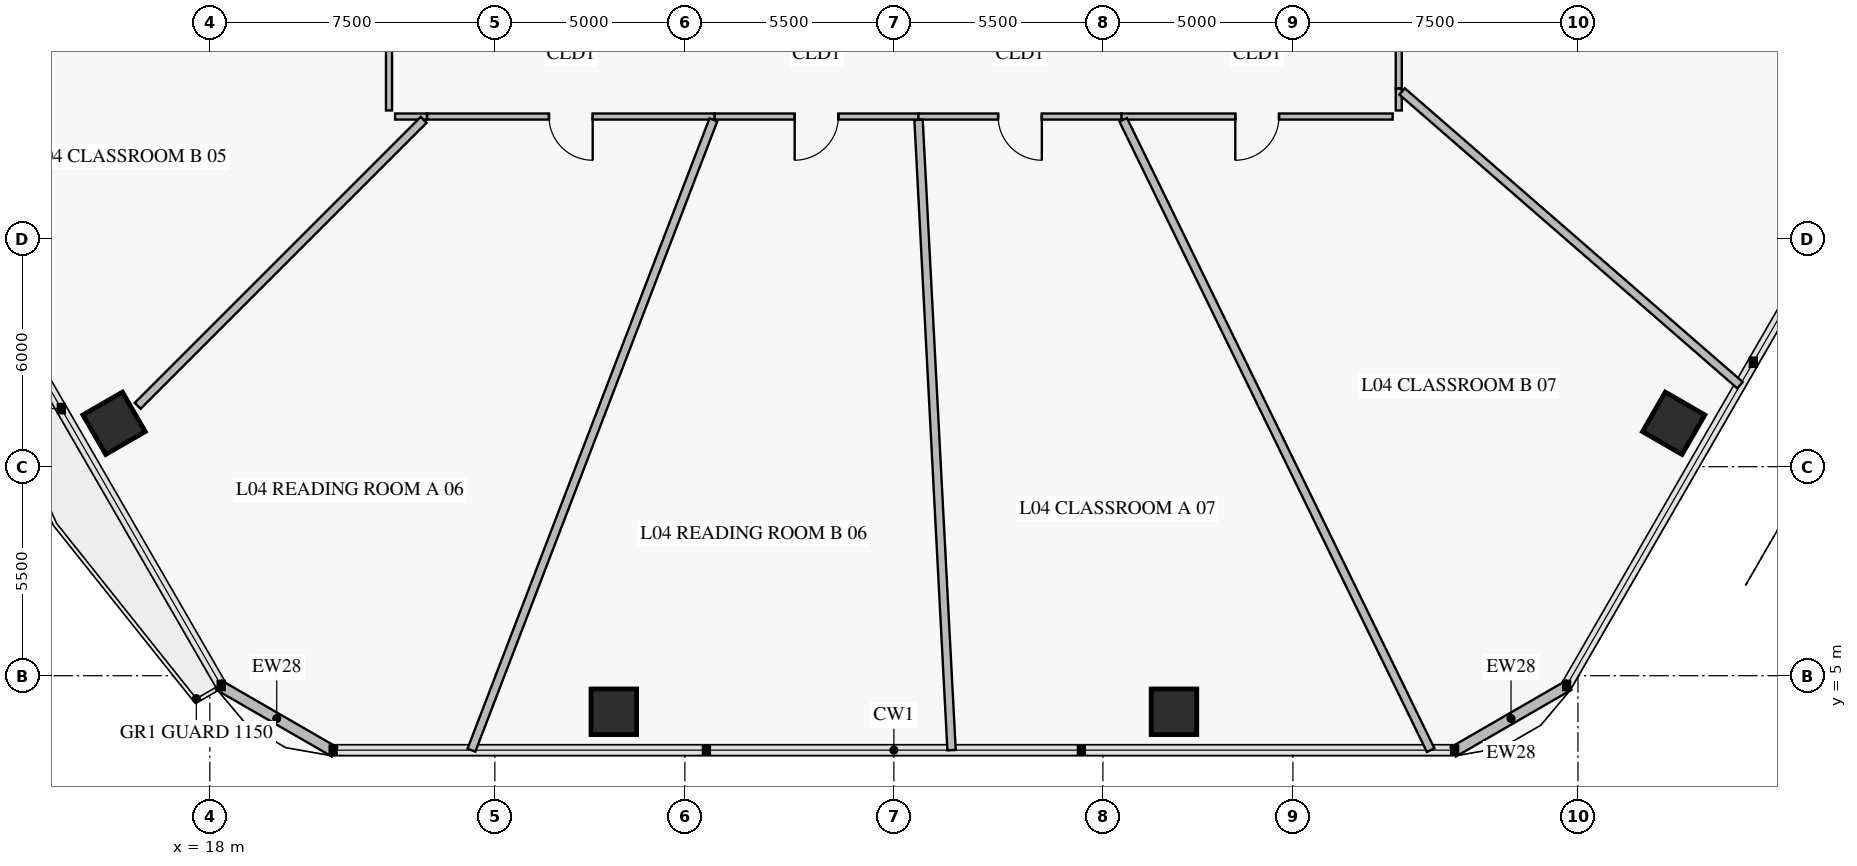
"""IFC4 building model, lengths in metres.
Left out: names, types, materials, properties, quantities, classifications, styles, units other than length and angle.
Written with IfcOpenShell. Run it as: python <this file> out.ifc"""

import sys

from ifc_helpers import new_model, si_unit, direction, frame, frame_2d, origin, origin_2d, place, context, subcontext, project, spatial, rectangle, extrude, element, fill, save


model = new_model("IFC4")
c1 = context("Model", 3, precision=1e-05, world=origin(), true_north=direction((0.0, 1.0)))
c2 = subcontext(c1, "Body", "Model", "MODEL_VIEW")
j1 = project(units=[si_unit("LENGTHUNIT", "METRE"), si_unit("PLANEANGLEUNIT", "RADIAN")], contexts=[c1])
p1 = place(None, origin())
s1 = spatial("IfcSite", under=j1, at=p1, CompositionType="ELEMENT")
p2 = place(p1, origin())
s2 = spatial("IfcBuilding", under=s1, at=p2, CompositionType="ELEMENT")
p3 = place(p2, frame((0.0, 0.0, 16.2)))
s3 = spatial("IfcBuildingStorey", under=s2, at=p3, CompositionType="ELEMENT", Elevation=16.2)
for number, where, z_axis, x_axis in (
    (1, (15.481, 11.643, 0.0), (0.0, 0.0, 1.0), (0.5, -0.866, 0.0)),
    (2, (28.63, 4.052, 0.0), (0.0, 0.0, 1.0), (1.0, 0.0, 0.0)),
    (3, (43.37, 4.052, 0.0), (0.0, 0.0, 1.0), (1.0, 0.0, 0.0)),
    (4, (56.519, 11.643, 0.0), (0.0, 0.0, 1.0), (0.5, 0.866, 0.0)),
):
    element("IfcColumn", number, at=place(p3, frame(where, z_axis=z_axis, x_axis=x_axis)), inside=s3, PredefinedType="COLUMN", context=c2, shape_type="SweptSolid", body=[
        extrude(rectangle(XDim=1.2, YDim=1.2, at=origin_2d()), origin(), (0.0, 0.0, 1.0), 3.92),
    ])
for number, where, z_axis, x_axis in (
    (5, (53.761, 4.751, 0.0), (0.0, 0.0, 1.0), (-0.866, -0.5, 0.0)),
    (6, (21.283, 2.994, 0.0), (0.0, 0.0, 1.0), (-0.866, 0.5, 0.0)),
):
    element("IfcWall", number, at=place(p3, frame(where, z_axis=z_axis, x_axis=x_axis)), inside=s3, PredefinedType="SOLIDWALL", context=c2, shape_type="SweptSolid", body=[
        extrude(rectangle(XDim=3.515, YDim=0.28, at=frame_2d((1.757, 0.0))), origin(), (0.0, 0.0, 1.0), 3.92),
    ])
p4 = place(p3, frame((22.715, 26.633, 0.0), z_axis=(0.0, 0.0, 1.0), x_axis=(0.0, -1.0, 0.0)))
e7 = element("IfcWall", 7, at=p4, inside=s3, PredefinedType="PARTITIONING", context=c2, shape_type="SweptSolid", body=[
    extrude(rectangle(XDim=6.758, YDim=0.16, at=frame_2d((3.379, 0.0))), origin(), (0.0, 0.0, 1.0), 3.92),
])
p5 = place(p4, frame((2.804, 0.0, 0.0)))
e8 = element("IfcOpeningElement", 8, at=p5, cuts=e7, PredefinedType="OPENING", context=c2, shape_type="SweptSolid", body=[
    extrude(rectangle(XDim=1.15, YDim=2.2, at=frame_2d((0.575, 1.1))), frame((0.0, 0.092, 0.0), z_axis=(0.0, -1.0, 0.0), x_axis=(1.0, 0.0, 0.0)), (0.0, 0.0, 1.0), 0.184),
])
p6 = place(p3, frame((23.715, 19.715, 0.0), z_axis=(0.0, 0.0, 1.0), x_axis=(1.0, 0.0, 0.0)))
e9 = element("IfcWall", 9, at=p6, inside=s3, PredefinedType="PARTITIONING", context=c2, shape_type="SweptSolid", body=[
    extrude(rectangle(XDim=7.569, YDim=0.16, at=frame_2d((3.785, 0.0))), origin(), (0.0, 0.0, 1.0), 3.22),
])
p7 = place(p6, frame((3.21, 0.0, 0.0)))
e10 = element("IfcOpeningElement", 10, at=p7, cuts=e9, PredefinedType="OPENING", context=c2, shape_type="SweptSolid", body=[
    extrude(rectangle(XDim=1.15, YDim=2.2, at=frame_2d((0.575, 1.1))), frame((0.0, 0.092, 0.0), z_axis=(0.0, -1.0, 0.0), x_axis=(1.0, 0.0, 0.0)), (0.0, 0.0, 1.0), 0.184),
])
p8 = place(p3, frame((31.284, 19.715, 0.0), z_axis=(0.0, 0.0, 1.0), x_axis=(1.0, 0.0, 0.0)))
e11 = element("IfcWall", 11, at=p8, inside=s3, PredefinedType="PARTITIONING", context=c2, shape_type="SweptSolid", body=[
    extrude(rectangle(XDim=5.36, YDim=0.16, at=frame_2d((2.68, 0.0))), origin(), (0.0, 0.0, 1.0), 3.22),
])
p9 = place(p8, frame((2.105, 0.0, 0.0)))
e12 = element("IfcOpeningElement", 12, at=p9, cuts=e11, PredefinedType="OPENING", context=c2, shape_type="SweptSolid", body=[
    extrude(rectangle(XDim=1.15, YDim=2.2, at=frame_2d((0.575, 1.1))), frame((0.0, 0.092, 0.0), z_axis=(0.0, -1.0, 0.0), x_axis=(1.0, 0.0, 0.0)), (0.0, 0.0, 1.0), 0.184),
])
p10 = place(p3, frame((36.644, 19.715, 0.0), z_axis=(0.0, 0.0, 1.0), x_axis=(1.0, 0.0, 0.0)))
e13 = element("IfcWall", 13, at=p10, inside=s3, PredefinedType="PARTITIONING", context=c2, shape_type="SweptSolid", body=[
    extrude(rectangle(XDim=5.348, YDim=0.16, at=frame_2d((2.674, 0.0))), origin(), (0.0, 0.0, 1.0), 3.22),
])
p11 = place(p10, frame((2.099, 0.0, 0.0)))
e14 = element("IfcOpeningElement", 14, at=p11, cuts=e13, PredefinedType="OPENING", context=c2, shape_type="SweptSolid", body=[
    extrude(rectangle(XDim=1.15, YDim=2.2, at=frame_2d((0.575, 1.1))), frame((0.0, 0.092, 0.0), z_axis=(0.0, -1.0, 0.0), x_axis=(1.0, 0.0, 0.0)), (0.0, 0.0, 1.0), 0.184),
])
p12 = place(p3, frame((41.992, 19.715, 0.0), z_axis=(0.0, 0.0, 1.0), x_axis=(1.0, 0.0, 0.0)))
e15 = element("IfcWall", 15, at=p12, inside=s3, PredefinedType="PARTITIONING", context=c2, shape_type="SweptSolid", body=[
    extrude(rectangle(XDim=7.133, YDim=0.16, at=frame_2d((3.567, 0.0))), origin(), (0.0, 0.0, 1.0), 3.22),
])
p13 = place(p12, frame((2.992, 0.0, 0.0)))
e16 = element("IfcOpeningElement", 16, at=p13, cuts=e15, PredefinedType="OPENING", context=c2, shape_type="SweptSolid", body=[
    extrude(rectangle(XDim=1.15, YDim=2.2, at=frame_2d((0.575, 1.1))), frame((0.0, 0.092, 0.0), z_axis=(0.0, -1.0, 0.0), x_axis=(1.0, 0.0, 0.0)), (0.0, 0.0, 1.0), 0.184),
])
p14 = place(p3, frame((49.285, 20.451, 0.0), z_axis=(0.0, 0.0, 1.0), x_axis=(0.0, 1.0, 0.0)))
e17 = element("IfcWall", 17, at=p14, inside=s3, PredefinedType="PARTITIONING", context=c2, shape_type="SweptSolid", body=[
    extrude(rectangle(XDim=12.711, YDim=0.16, at=frame_2d((6.355, 0.0))), origin(), (0.0, 0.0, 1.0), 3.22),
])
p15 = place(p14, frame((5.88, 0.0, 0.0)))
e18 = element("IfcOpeningElement", 18, at=p15, cuts=e17, PredefinedType="OPENING", context=c2, shape_type="SweptSolid", body=[
    extrude(rectangle(XDim=0.95, YDim=2.1, at=frame_2d((0.475, 1.05))), frame((0.0, 0.092, 0.0), z_axis=(0.0, -1.0, 0.0), x_axis=(1.0, 0.0, 0.0)), (0.0, 0.0, 1.0), 0.184),
])
p16 = place(p3, frame((22.627, 26.597, 0.0), z_axis=(0.0, 0.0, 1.0), x_axis=(-0.927186166431, -0.3746008713, 0.0)))
e19 = element("IfcWall", 19, at=p16, inside=s3, PredefinedType="PARTITIONING", context=c2, shape_type="SweptSolid", body=[
    extrude(rectangle(XDim=14.82, YDim=0.22, at=frame_2d((7.41, 0.0))), origin(), (0.0, 0.0, 1.0), 3.17),
])
p17 = place(p3, frame((22.875, 19.715, 0.0), z_axis=(0.0, 0.0, 1.0), x_axis=(1.0, 0.0, 0.0)))
e20 = element("IfcWall", 20, at=p17, inside=s3, PredefinedType="PARTITIONING", context=c2, shape_type="SweptSolid", body=[
    extrude(rectangle(XDim=0.84, YDim=0.16, at=frame_2d((0.42, 0.0))), origin(), (0.0, 0.0, 1.0), 3.22),
])
p18 = place(p3, frame((23.627, 19.627, 0.0), z_axis=(0.0, 0.0, 1.0), x_axis=(-0.707106781187, -0.707106781187, 0.0)))
e21 = element("IfcWall", 21, at=p18, inside=s3, PredefinedType="PARTITIONING", context=c2, shape_type="SweptSolid", body=[
    extrude(rectangle(XDim=10.643, YDim=0.22, at=frame_2d((5.322, 0.0))), origin(), (0.0, 0.0, 1.0), 3.22),
])
p19 = place(p3, frame((31.25, 19.627, 0.0), z_axis=(0.0, 0.0, 1.0), x_axis=(-0.358374904207, -0.933577756823, 0.0)))
e22 = element("IfcWall", 22, at=p19, inside=s3, PredefinedType="PARTITIONING", context=c2, shape_type="SweptSolid", body=[
    extrude(rectangle(XDim=17.765, YDim=0.22, at=frame_2d((8.883, 0.0))), origin(), (0.0, 0.0, 1.0), 3.17),
])
p20 = place(p3, frame((36.648, 19.627, 0.0), z_axis=(0.0, 0.0, 1.0), x_axis=(0.052331996973, -0.998629742243, 0.0)))
e23 = element("IfcWall", 23, at=p20, inside=s3, PredefinedType="PARTITIONING", context=c2, shape_type="SweptSolid", body=[
    extrude(rectangle(XDim=16.608, YDim=0.22, at=frame_2d((8.304, 0.0))), origin(), (0.0, 0.0, 1.0), 3.17),
])
p21 = place(p3, frame((42.035, 19.627, 0.0), z_axis=(0.0, 0.0, 1.0), x_axis=(0.438375147569, -0.898792094977, 0.0)))
e24 = element("IfcWall", 24, at=p21, inside=s3, PredefinedType="PARTITIONING", context=c2, shape_type="SweptSolid", body=[
    extrude(rectangle(XDim=18.453, YDim=0.22, at=frame_2d((9.227, 0.0))), origin(), (0.0, 0.0, 1.0), 3.17),
])
p22 = place(p3, frame((49.285, 19.875, 0.0), z_axis=(0.0, 0.0, 1.0), x_axis=(0.0, 1.0, 0.0)))
e25 = element("IfcWall", 25, at=p22, inside=s3, PredefinedType="PARTITIONING", context=c2, shape_type="SweptSolid", body=[
    extrude(rectangle(XDim=0.576, YDim=0.16, at=frame_2d((0.288, 0.0))), origin(), (0.0, 0.0, 1.0), 3.92),
])
p23 = place(p3, frame((49.373, 20.375, 0.0), z_axis=(0.0, 0.0, 1.0), x_axis=(0.754715261602, -0.656052493254, 0.0)))
e26 = element("IfcWall", 26, at=p23, inside=s3, PredefinedType="PARTITIONING", context=c2, shape_type="SweptSolid", body=[
    extrude(rectangle(XDim=11.781, YDim=0.22, at=frame_2d((5.891, 0.0))), origin(), (0.0, 0.0, 1.0), 3.17),
])
p24 = place(p7, frame((1.15, 0.0, 0.0), z_axis=(0.0, 0.0, 1.0), x_axis=(-1.0, 0.0, 0.0)))
e27 = element("IfcDoor", 27, at=p24, inside=s3, OperationType="SINGLE_SWING_LEFT", PredefinedType="DOOR", context=c2, shape_type="SweptSolid", body=[
    extrude(rectangle(XDim=1.15, YDim=2.2, at=frame_2d((0.575, 1.1))), frame((0.0, 0.025, 0.0), z_axis=(0.0, -1.0, 0.0), x_axis=(1.0, 0.0, 0.0)), (0.0, 0.0, 1.0), 0.05),
])
fill(e10, e27)
p25 = place(p9, frame((1.15, 0.0, 0.0), z_axis=(0.0, 0.0, 1.0), x_axis=(-1.0, 0.0, 0.0)))
e28 = element("IfcDoor", 28, at=p25, inside=s3, OperationType="SINGLE_SWING_RIGHT", PredefinedType="DOOR", context=c2, shape_type="SweptSolid", body=[
    extrude(rectangle(XDim=1.15, YDim=2.2, at=frame_2d((0.575, 1.1))), frame((0.0, 0.025, 0.0), z_axis=(0.0, -1.0, 0.0), x_axis=(1.0, 0.0, 0.0)), (0.0, 0.0, 1.0), 0.05),
])
fill(e12, e28)
p26 = place(p11, frame((1.15, 0.0, 0.0), z_axis=(0.0, 0.0, 1.0), x_axis=(-1.0, 0.0, 0.0)))
e29 = element("IfcDoor", 29, at=p26, inside=s3, OperationType="SINGLE_SWING_LEFT", PredefinedType="DOOR", context=c2, shape_type="SweptSolid", body=[
    extrude(rectangle(XDim=1.15, YDim=2.2, at=frame_2d((0.575, 1.1))), frame((0.0, 0.025, 0.0), z_axis=(0.0, -1.0, 0.0), x_axis=(1.0, 0.0, 0.0)), (0.0, 0.0, 1.0), 0.05),
])
fill(e14, e29)
p27 = place(p13, frame((1.15, 0.0, 0.0), z_axis=(0.0, 0.0, 1.0), x_axis=(-1.0, 0.0, 0.0)))
e30 = element("IfcDoor", 30, at=p27, inside=s3, OperationType="SINGLE_SWING_RIGHT", PredefinedType="DOOR", context=c2, shape_type="SweptSolid", body=[
    extrude(rectangle(XDim=1.15, YDim=2.2, at=frame_2d((0.575, 1.1))), frame((0.0, 0.025, 0.0), z_axis=(0.0, -1.0, 0.0), x_axis=(1.0, 0.0, 0.0)), (0.0, 0.0, 1.0), 0.05),
])
fill(e16, e30)
save(model, sys.argv[1])
